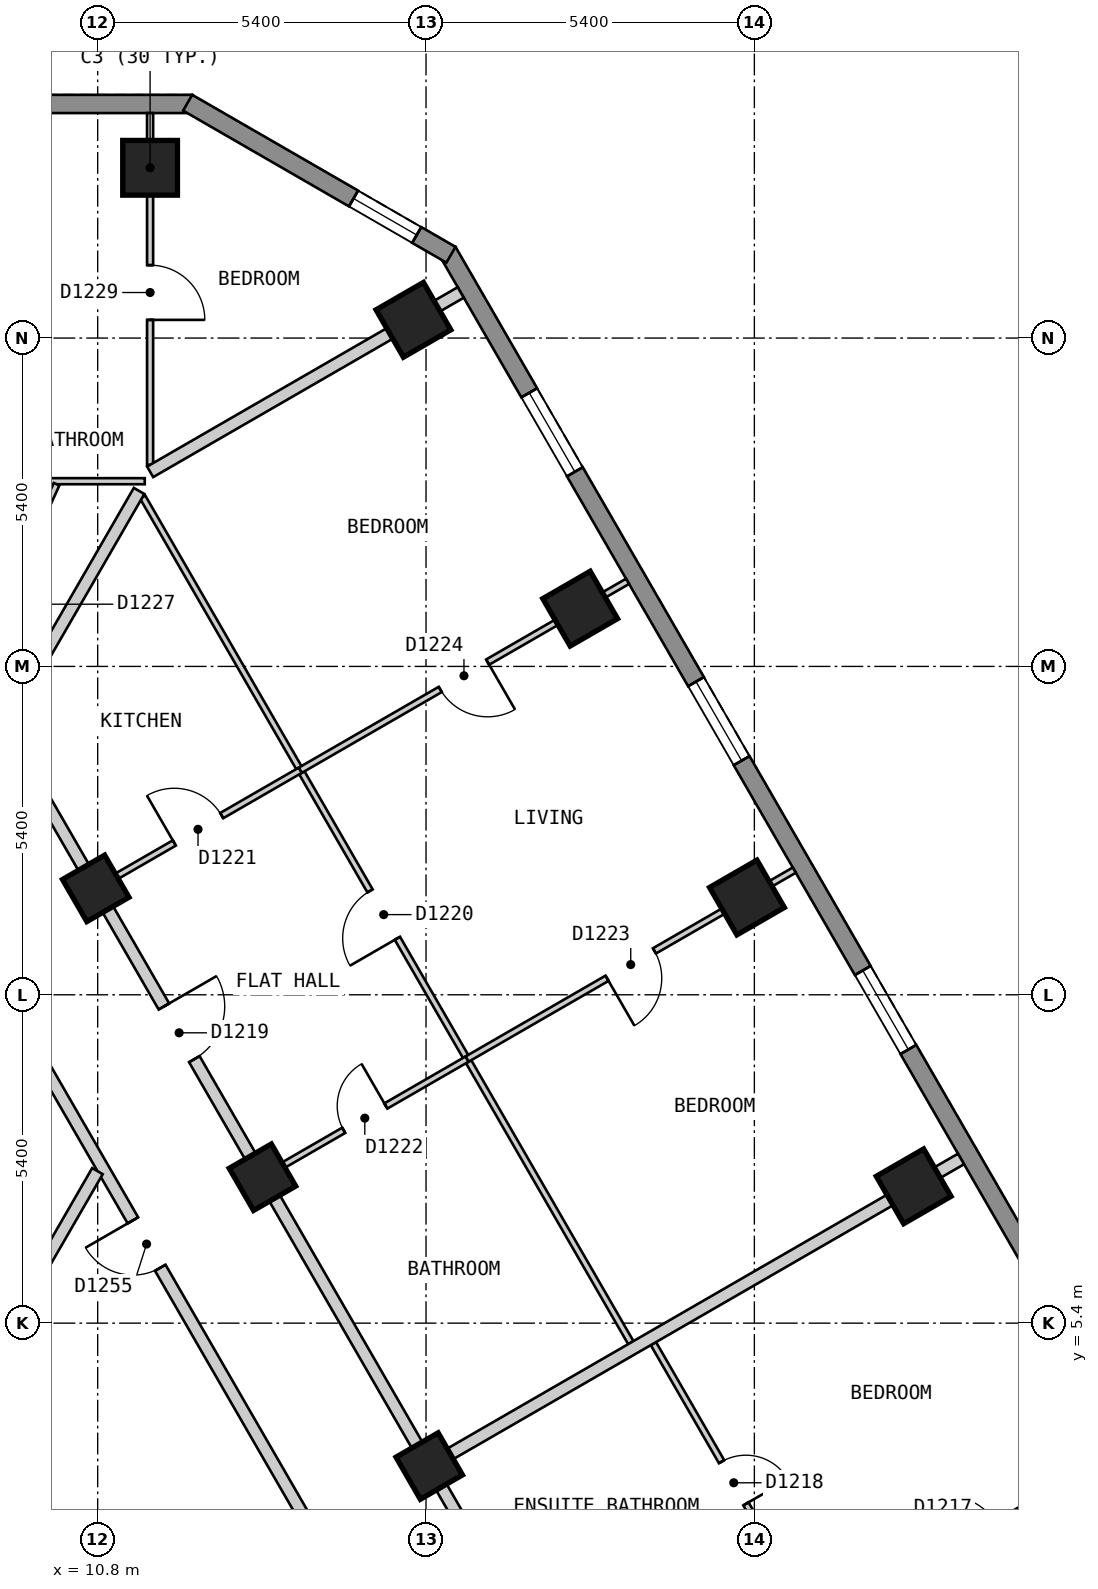
"""IFC4 building model, lengths in metres.
Left out: names, types, materials, properties, quantities, classifications, styles, units other than length and angle.
Written with IfcOpenShell. Run it as: python <this file> out.ifc"""

import sys

from ifc_helpers import new_model, si_unit, direction, frame, frame_2d, origin, origin_2d, place, context, subcontext, project, spatial, polyline, rectangle, outline, extrude, element, fill, save


model = new_model("IFC4")
c1 = context("Model", 3, precision=1e-05, world=origin(), true_north=direction((0.0, 1.0)))
c2 = subcontext(c1, "Body", "Model", "MODEL_VIEW")
j1 = project(units=[si_unit("LENGTHUNIT", "METRE"), si_unit("PLANEANGLEUNIT", "RADIAN")], contexts=[c1])
p1 = place(None, origin())
s1 = spatial("IfcSite", under=j1, at=p1, CompositionType="ELEMENT")
p2 = place(p1, origin())
s2 = spatial("IfcBuilding", under=s1, at=p2, CompositionType="ELEMENT")
p3 = place(p2, frame((0.0, 0.0, 117.6)))
s3 = spatial("IfcBuildingStorey", under=s2, at=p3, CompositionType="ELEMENT", Elevation=117.6)
for number, where, z_axis, x_axis in (
    (1, (11.662, 24.4, 0.0), (0.0, 0.0, 1.0), (-1.0, 0.0, 0.0)),
    (2, (24.22, 7.65, 0.0), (0.0, 0.0, 1.0), (-0.5, 0.866, 0.0)),
    (3, (21.478, 12.4, 0.0), (0.0, 0.0, 1.0), (-0.5, 0.866, 0.0)),
    (4, (18.735, 17.15, 0.0), (0.0, 0.0, 1.0), (-0.5, 0.866, 0.0)),
    (5, (15.993, 21.9, 0.0), (0.0, 0.0, 1.0), (-0.5, 0.866, 0.0)),
):
    element("IfcColumn", number, at=place(p3, frame(where, z_axis=z_axis, x_axis=x_axis)), inside=s3, PredefinedType="COLUMN", context=c2, shape_type="SweptSolid", body=[
        extrude(rectangle(XDim=0.9, YDim=0.9, at=origin_2d()), origin(), (0.0, 0.0, 1.0), 3.0),
    ])
for number, where, z_axis, x_axis in (
    (6, (16.253, 3.05, 0.0), (0.0, 0.0, 1.0), (-0.5, 0.866, 0.0)),
    (7, (13.51, 7.8, 0.0), (0.0, 0.0, 1.0), (-0.5, 0.866, 0.0)),
    (8, (10.768, 12.55, 0.0), (0.0, 0.0, 1.0), (-0.5, 0.866, 0.0)),
):
    element("IfcColumn", number, at=place(p3, frame(where, z_axis=z_axis, x_axis=x_axis)), inside=s3, PredefinedType="COLUMN", context=c2, shape_type="SweptSolid", body=[
        extrude(rectangle(XDim=0.8, YDim=0.8, at=origin_2d()), origin(), (0.0, 0.0, 1.0), 3.0),
    ])
p4 = place(p3, frame((12.355, 25.45, 0.0), z_axis=(0.0, 0.0, 1.0), x_axis=(-1.0, 0.0, 0.0)))
e9 = element("IfcWall", 9, at=p4, inside=s3, PredefinedType="SOLIDWALL", context=c2, shape_type="SweptSolid", body=[
    extrude(outline(polyline([(0.0, -0.15), (24.71, -0.15), (24.63, 0.15), (0.08, 0.15), (0.0, -0.15)])), origin(), (0.0, 0.0, 1.0), 2.7),
])
p5 = place(p4, frame((2.858, 0.0, 0.15)))
e10 = element("IfcOpeningElement", 10, at=p5, cuts=e9, PredefinedType="OPENING", context=c2, shape_type="SweptSolid", body=[
    extrude(rectangle(XDim=1.5, YDim=2.1, at=frame_2d((0.75, 1.05))), frame((0.0, 0.16, 0.0), z_axis=(0.0, -1.0, 0.0), x_axis=(1.0, 0.0, 0.0)), (0.0, 0.0, 1.0), 0.32),
])
p6 = place(p4, frame((8.689, 0.0, 0.15)))
e11 = element("IfcOpeningElement", 11, at=p6, cuts=e9, PredefinedType="OPENING", context=c2, shape_type="SweptSolid", body=[
    extrude(rectangle(XDim=1.5, YDim=2.1, at=frame_2d((0.75, 1.05))), frame((0.0, 0.16, 0.0), z_axis=(0.0, -1.0, 0.0), x_axis=(1.0, 0.0, 0.0)), (0.0, 0.0, 1.0), 0.32),
])
p7 = place(p4, frame((14.521, 0.0, 0.15)))
e12 = element("IfcOpeningElement", 12, at=p7, cuts=e9, PredefinedType="OPENING", context=c2, shape_type="SweptSolid", body=[
    extrude(rectangle(XDim=1.5, YDim=2.1, at=frame_2d((0.75, 1.05))), frame((0.0, 0.16, 0.0), z_axis=(0.0, -1.0, 0.0), x_axis=(1.0, 0.0, 0.0)), (0.0, 0.0, 1.0), 0.32),
])
p8 = place(p4, frame((20.352, 0.0, 0.15)))
e13 = element("IfcOpeningElement", 13, at=p8, cuts=e9, PredefinedType="OPENING", context=c2, shape_type="SweptSolid", body=[
    extrude(rectangle(XDim=1.5, YDim=2.1, at=frame_2d((0.75, 1.05))), frame((0.0, 0.16, 0.0), z_axis=(0.0, -1.0, 0.0), x_axis=(1.0, 0.0, 0.0)), (0.0, 0.0, 1.0), 0.32),
])
p9 = place(p3, frame((28.218, 2.825, 0.0), z_axis=(0.0, 0.0, 1.0), x_axis=(-0.500020536353, 0.866013546791, 0.0)))
e14 = element("IfcWall", 14, at=p9, inside=s3, PredefinedType="SOLIDWALL", context=c2, shape_type="SweptSolid", body=[
    extrude(outline(polyline([(0.0, -0.15), (23.325, -0.15), (23.245, 0.15), (0.08, 0.15), (0.0, -0.15)])), origin(), (0.0, 0.0, 1.0), 2.7),
])
p10 = place(p9, frame((2.685, 0.0, 0.15)))
e15 = element("IfcOpeningElement", 15, at=p10, cuts=e14, PredefinedType="OPENING", context=c2, shape_type="SweptSolid", body=[
    extrude(rectangle(XDim=1.5, YDim=2.1, at=frame_2d((0.75, 1.05))), frame((0.0, 0.16, 0.0), z_axis=(0.0, -1.0, 0.0), x_axis=(1.0, 0.0, 0.0)), (0.0, 0.0, 1.0), 0.32),
])
p11 = place(p9, frame((8.17, 0.0, 0.15)))
e16 = element("IfcOpeningElement", 16, at=p11, cuts=e14, PredefinedType="OPENING", context=c2, shape_type="SweptSolid", body=[
    extrude(rectangle(XDim=1.5, YDim=2.1, at=frame_2d((0.75, 1.05))), frame((0.0, 0.16, 0.0), z_axis=(0.0, -1.0, 0.0), x_axis=(1.0, 0.0, 0.0)), (0.0, 0.0, 1.0), 0.32),
])
p12 = place(p9, frame((13.655, 0.0, 0.15)))
e17 = element("IfcOpeningElement", 17, at=p12, cuts=e14, PredefinedType="OPENING", context=c2, shape_type="SweptSolid", body=[
    extrude(rectangle(XDim=1.5, YDim=2.1, at=frame_2d((0.75, 1.05))), frame((0.0, 0.16, 0.0), z_axis=(0.0, -1.0, 0.0), x_axis=(1.0, 0.0, 0.0)), (0.0, 0.0, 1.0), 0.32),
])
p13 = place(p9, frame((19.14, 0.0, 0.15)))
e18 = element("IfcOpeningElement", 18, at=p13, cuts=e14, PredefinedType="OPENING", context=c2, shape_type="SweptSolid", body=[
    extrude(rectangle(XDim=1.5, YDim=2.1, at=frame_2d((0.75, 1.05))), frame((0.0, 0.16, 0.0), z_axis=(0.0, -1.0, 0.0), x_axis=(1.0, 0.0, 0.0)), (0.0, 0.0, 1.0), 0.32),
])
p14 = place(p3, frame((16.61, 22.97, 0.0), z_axis=(0.0, 0.0, 1.0), x_axis=(-0.866022959057, 0.500004234368, 0.0)))
e19 = element("IfcWall", 19, at=p14, inside=s3, PredefinedType="SOLIDWALL", context=c2, shape_type="SweptSolid", body=[
    extrude(outline(polyline([(0.0, -0.15), (5.0, -0.15), (4.92, 0.15), (0.08, 0.15), (0.0, -0.15)])), origin(), (0.0, 0.0, 1.0), 2.7),
])
p15 = place(p14, frame((0.65, 0.0, 0.15)))
e20 = element("IfcOpeningElement", 20, at=p15, cuts=e19, PredefinedType="OPENING", context=c2, shape_type="SweptSolid", body=[
    extrude(rectangle(XDim=1.2, YDim=2.1, at=frame_2d((0.6, 1.05))), frame((0.0, 0.16, 0.0), z_axis=(0.0, -1.0, 0.0), x_axis=(1.0, 0.0, 0.0)), (0.0, 0.0, 1.0), 0.32),
])
p16 = place(p3, frame((7.967, 13.0, 0.0), z_axis=(0.0, 0.0, 1.0), x_axis=(0.50003774998, -0.866003607726, 0.0)))
e21 = element("IfcWall", 21, at=p16, inside=s3, PredefinedType="PARTITIONING", context=c2, shape_type="SweptSolid", body=[
    extrude(rectangle(XDim=14.433, YDim=0.2, at=frame_2d((7.217, 0.0))), origin(), (0.0, 0.0, 1.0), 2.7),
])
p17 = place(p16, frame((6.824, 0.0, 0.0)))
e22 = element("IfcOpeningElement", 22, at=p17, cuts=e21, PredefinedType="OPENING", context=c2, shape_type="SweptSolid", body=[
    extrude(rectangle(XDim=0.9, YDim=2.1, at=frame_2d((0.45, 1.05))), frame((0.0, 0.11, 0.0), z_axis=(0.0, -1.0, 0.0), x_axis=(1.0, 0.0, 0.0)), (0.0, 0.0, 1.0), 0.22),
])
p18 = place(p3, frame((9.296, 15.1, 0.0), z_axis=(0.0, 0.0, 1.0), x_axis=(0.499974024244, -0.866040400375, 0.0)))
e23 = element("IfcWall", 23, at=p18, inside=s3, PredefinedType="PARTITIONING", context=c2, shape_type="SweptSolid", body=[
    extrude(rectangle(XDim=16.857, YDim=0.2, at=frame_2d((8.429, 0.0))), origin(), (0.0, 0.0, 1.0), 2.7),
])
p19 = place(p18, frame((5.187, 0.0, 0.0)))
e24 = element("IfcOpeningElement", 24, at=p19, cuts=e23, PredefinedType="OPENING", context=c2, shape_type="SweptSolid", body=[
    extrude(rectangle(XDim=1.0, YDim=2.1, at=frame_2d((0.5, 1.05))), frame((0.0, 0.11, 0.0), z_axis=(0.0, -1.0, 0.0), x_axis=(1.0, 0.0, 0.0)), (0.0, 0.0, 1.0), 0.22),
])
p20 = place(p3, frame((7.028, 1.373, 0.0), z_axis=(0.0, 0.0, 1.0), x_axis=(0.499954271211, 0.866051803703, 0.0)))
e25 = element("IfcWall", 25, at=p20, inside=s3, PredefinedType="PARTITIONING", context=c2, shape_type="SweptSolid", body=[
    extrude(rectangle(XDim=7.536, YDim=0.2, at=frame_2d((3.768, 0.0))), origin(), (0.0, 0.0, 1.0), 2.7),
])
p21 = place(p3, frame((11.539, 18.986, 0.0), z_axis=(0.0, 0.0, 1.0), x_axis=(0.500019453803, -0.866014171835, 0.0)))
e26 = element("IfcWall", 26, at=p21, inside=s3, PredefinedType="PARTITIONING", context=c2, shape_type="SweptSolid", body=[
    extrude(rectangle(XDim=16.057, YDim=0.1, at=frame_2d((8.029, 0.0))), origin(), (0.0, 0.0, 1.0), 2.7),
])
p22 = place(p21, frame((7.48, 0.0, 0.0)))
e27 = element("IfcOpeningElement", 27, at=p22, cuts=e26, PredefinedType="OPENING", context=c2, shape_type="SweptSolid", body=[
    extrude(rectangle(XDim=0.9, YDim=2.1, at=frame_2d((0.45, 1.05))), frame((0.0, 0.06, 0.0), z_axis=(0.0, -1.0, 0.0), x_axis=(1.0, 0.0, 0.0)), (0.0, 0.0, 1.0), 0.12),
])
p23 = place(p3, frame((19.94, 5.063, 0.0), z_axis=(0.0, 0.0, 1.0), x_axis=(0.500025085526, -0.866010920165, 0.0)))
e28 = element("IfcWall", 28, at=p23, inside=s3, PredefinedType="PARTITIONING", context=c2, shape_type="SweptSolid", body=[
    extrude(rectangle(XDim=5.284, YDim=0.1, at=frame_2d((2.642, 0.0))), origin(), (0.0, 0.0, 1.0), 2.7),
])
p24 = place(p23, frame((2.242, 0.0, 0.0)))
e29 = element("IfcOpeningElement", 29, at=p24, cuts=e28, PredefinedType="OPENING", context=c2, shape_type="SweptSolid", body=[
    extrude(rectangle(XDim=0.8, YDim=2.1, at=frame_2d((0.4, 1.05))), frame((0.0, 0.06, 0.0), z_axis=(0.0, -1.0, 0.0), x_axis=(1.0, 0.0, 0.0)), (0.0, 0.0, 1.0), 0.12),
])
p25 = place(p3, frame((9.033, 19.246, 0.0), z_axis=(0.0, 0.0, 1.0), x_axis=(1.0, 0.0, 0.0)))
e30 = element("IfcWall", 30, at=p25, inside=s3, PredefinedType="PARTITIONING", context=c2, shape_type="SweptSolid", body=[
    extrude(rectangle(XDim=2.541, YDim=0.1, at=frame_2d((1.271, 0.0))), origin(), (0.0, 0.0, 1.0), 2.7),
])
p26 = place(p25, frame((0.117, 0.0, 0.0)))
e31 = element("IfcOpeningElement", 31, at=p26, cuts=e30, PredefinedType="OPENING", context=c2, shape_type="SweptSolid", body=[
    extrude(rectangle(XDim=0.7, YDim=2.1, at=frame_2d((0.35, 1.05))), frame((0.0, 0.06, 0.0), z_axis=(0.0, -1.0, 0.0), x_axis=(1.0, 0.0, 0.0)), (0.0, 0.0, 1.0), 0.12),
])
p27 = place(p3, frame((8.346, 15.3, 0.0), z_axis=(0.0, 0.0, 1.0), x_axis=(0.415189790387, 0.909734817383, 0.0)))
e32 = element("IfcWall", 32, at=p27, inside=s3, PredefinedType="PARTITIONING", context=c2, shape_type="SweptSolid", body=[
    extrude(rectangle(XDim=4.282, YDim=0.1, at=frame_2d((2.141, 0.0))), origin(), (0.0, 0.0, 1.0), 2.7),
])
p28 = place(p27, frame((1.714, 0.0, 0.0)))
e33 = element("IfcOpeningElement", 33, at=p28, cuts=e32, PredefinedType="OPENING", context=c2, shape_type="SweptSolid", body=[
    extrude(rectangle(XDim=0.8, YDim=2.1, at=frame_2d((0.4, 1.05))), frame((0.0, 0.06, 0.0), z_axis=(0.0, -1.0, 0.0), x_axis=(1.0, 0.0, 0.0)), (0.0, 0.0, 1.0), 0.12),
])
p29 = place(p3, frame((11.662, 19.514, 0.0), z_axis=(0.0, 0.0, 1.0), x_axis=(0.0, 1.0, 0.0)))
e34 = element("IfcWall", 34, at=p29, inside=s3, PredefinedType="PARTITIONING", context=c2, shape_type="SweptSolid", body=[
    extrude(rectangle(XDim=5.786, YDim=0.1, at=frame_2d((2.893, 0.0))), origin(), (0.0, 0.0, 1.0), 2.7),
])
p30 = place(p29, frame((2.385, 0.0, 0.0)))
e35 = element("IfcOpeningElement", 35, at=p30, cuts=e34, PredefinedType="OPENING", context=c2, shape_type="SweptSolid", body=[
    extrude(rectangle(XDim=0.9, YDim=2.1, at=frame_2d((0.45, 1.05))), frame((0.0, 0.06, 0.0), z_axis=(0.0, -1.0, 0.0), x_axis=(1.0, 0.0, 0.0)), (0.0, 0.0, 1.0), 0.12),
])
p31 = place(p3, frame((22.634, 0.401, 0.0), z_axis=(0.0, 0.0, 1.0), x_axis=(0.86601325737, 0.500021037617, 0.0)))
e36 = element("IfcWall", 36, at=p31, inside=s3, PredefinedType="PARTITIONING", context=c2, shape_type="SweptSolid", body=[
    extrude(rectangle(XDim=5.898, YDim=0.1, at=frame_2d((2.949, 0.0))), origin(), (0.0, 0.0, 1.0), 2.7),
])
p32 = place(p31, frame((2.499, 0.0, 0.0)))
e37 = element("IfcOpeningElement", 37, at=p32, cuts=e36, PredefinedType="OPENING", context=c2, shape_type="SweptSolid", body=[
    extrude(rectangle(XDim=0.9, YDim=2.1, at=frame_2d((0.45, 1.05))), frame((0.0, 0.06, 0.0), z_axis=(0.0, -1.0, 0.0), x_axis=(1.0, 0.0, 0.0)), (0.0, 0.0, 1.0), 0.12),
])
p33 = place(p3, frame((13.597, 7.85, 0.0), z_axis=(0.0, 0.0, 1.0), x_axis=(0.8660642533, 0.499932704626, 0.0)))
e38 = element("IfcWall", 38, at=p33, inside=s3, PredefinedType="PARTITIONING", context=c2, shape_type="SweptSolid", body=[
    extrude(rectangle(XDim=3.786, YDim=0.1, at=frame_2d((1.893, 0.0))), origin(), (0.0, 0.0, 1.0), 2.7),
])
p34 = place(p33, frame((1.443, 0.0, 0.0)))
e39 = element("IfcOpeningElement", 39, at=p34, cuts=e38, PredefinedType="OPENING", context=c2, shape_type="SweptSolid", body=[
    extrude(rectangle(XDim=0.8, YDim=2.1, at=frame_2d((0.4, 1.05))), frame((0.0, 0.06, 0.0), z_axis=(0.0, -1.0, 0.0), x_axis=(1.0, 0.0, 0.0)), (0.0, 0.0, 1.0), 0.12),
])
p35 = place(p3, frame((10.854, 12.6, 0.0), z_axis=(0.0, 0.0, 1.0), x_axis=(0.8660642533, 0.499932704626, 0.0)))
e40 = element("IfcWall", 40, at=p35, inside=s3, PredefinedType="PARTITIONING", context=c2, shape_type="SweptSolid", body=[
    extrude(rectangle(XDim=3.786, YDim=0.1, at=frame_2d((1.893, 0.0))), origin(), (0.0, 0.0, 1.0), 2.7),
])
p36 = place(p35, frame((1.393, 0.0, 0.0)))
e41 = element("IfcOpeningElement", 41, at=p36, cuts=e40, PredefinedType="OPENING", context=c2, shape_type="SweptSolid", body=[
    extrude(rectangle(XDim=0.9, YDim=2.1, at=frame_2d((0.45, 1.05))), frame((0.0, 0.06, 0.0), z_axis=(0.0, -1.0, 0.0), x_axis=(1.0, 0.0, 0.0)), (0.0, 0.0, 1.0), 0.12),
])
p37 = place(p3, frame((9.238, 15.2, 0.0), z_axis=(0.0, 0.0, 1.0), x_axis=(0.499890453443, 0.866088641281, 0.0)))
e42 = element("IfcWall", 42, at=p37, inside=s3, PredefinedType="PARTITIONING", context=c2, shape_type="SweptSolid", body=[
    extrude(rectangle(XDim=4.487, YDim=0.2, at=frame_2d((2.243, 0.0))), origin(), (0.0, 0.0, 1.0), 2.7),
])
p38 = place(p3, frame((16.339, 3.1, 0.0), z_axis=(0.0, 0.0, 1.0), x_axis=(0.866016855193, 0.500014806302, 0.0)))
e43 = element("IfcWall", 43, at=p38, inside=s3, PredefinedType="PARTITIONING", context=c2, shape_type="SweptSolid", body=[
    extrude(rectangle(XDim=10.0, YDim=0.2, at=frame_2d((5.0, 0.0))), origin(), (0.0, 0.0, 1.0), 2.7),
])
p39 = place(p3, frame((11.663, 19.4, 0.0), z_axis=(0.0, 0.0, 1.0), x_axis=(0.865941558533, 0.500145196124, 0.0)))
e44 = element("IfcWall", 44, at=p39, inside=s3, PredefinedType="PARTITIONING", context=c2, shape_type="SweptSolid", body=[
    extrude(rectangle(XDim=5.899, YDim=0.2, at=frame_2d((2.949, 0.0))), origin(), (0.0, 0.0, 1.0), 2.7),
])
p40 = place(p3, frame((16.876, 9.743, 0.0), z_axis=(0.0, 0.0, 1.0), x_axis=(0.865997794851, 0.500047817026, 0.0)))
e45 = element("IfcWall", 45, at=p40, inside=s3, PredefinedType="PARTITIONING", context=c2, shape_type="SweptSolid", body=[
    extrude(rectangle(XDim=6.214, YDim=0.1, at=frame_2d((3.107, 0.0))), origin(), (0.0, 0.0, 1.0), 2.7),
])
p41 = place(p40, frame((2.657, 0.0, 0.0)))
e46 = element("IfcOpeningElement", 46, at=p41, cuts=e45, PredefinedType="OPENING", context=c2, shape_type="SweptSolid", body=[
    extrude(rectangle(XDim=0.9, YDim=2.1, at=frame_2d((0.45, 1.05))), frame((0.0, 0.06, 0.0), z_axis=(0.0, -1.0, 0.0), x_axis=(1.0, 0.0, 0.0)), (0.0, 0.0, 1.0), 0.12),
])
p42 = place(p3, frame((14.133, 14.493, 0.0), z_axis=(0.0, 0.0, 1.0), x_axis=(0.866056028236, 0.499946953142, 0.0)))
e47 = element("IfcWall", 47, at=p42, inside=s3, PredefinedType="PARTITIONING", context=c2, shape_type="SweptSolid", body=[
    extrude(rectangle(XDim=6.213, YDim=0.1, at=frame_2d((3.106, 0.0))), origin(), (0.0, 0.0, 1.0), 2.7),
])
p43 = place(p42, frame((2.657, 0.0, 0.0)))
e48 = element("IfcOpeningElement", 48, at=p43, cuts=e47, PredefinedType="OPENING", context=c2, shape_type="SweptSolid", body=[
    extrude(rectangle(XDim=0.9, YDim=2.1, at=frame_2d((0.45, 1.05))), frame((0.0, 0.06, 0.0), z_axis=(0.0, -1.0, 0.0), x_axis=(1.0, 0.0, 0.0)), (0.0, 0.0, 1.0), 0.12),
])
p44 = place(p11, origin())
e49 = element("IfcWindow", 49, at=p44, inside=s3, PartitioningType="SINGLE_PANEL", PredefinedType="WINDOW", context=c2, shape_type="SweptSolid", body=[
    extrude(rectangle(XDim=1.5, YDim=2.1, at=frame_2d((0.75, 1.05))), frame((0.0, 0.03, 0.0), z_axis=(0.0, -1.0, 0.0), x_axis=(1.0, 0.0, 0.0)), (0.0, 0.0, 1.0), 0.06),
])
fill(e16, e49)
p45 = place(p12, origin())
e50 = element("IfcWindow", 50, at=p45, inside=s3, PartitioningType="SINGLE_PANEL", PredefinedType="WINDOW", context=c2, shape_type="SweptSolid", body=[
    extrude(rectangle(XDim=1.5, YDim=2.1, at=frame_2d((0.75, 1.05))), frame((0.0, 0.03, 0.0), z_axis=(0.0, -1.0, 0.0), x_axis=(1.0, 0.0, 0.0)), (0.0, 0.0, 1.0), 0.06),
])
fill(e17, e50)
p46 = place(p13, origin())
e51 = element("IfcWindow", 51, at=p46, inside=s3, PartitioningType="SINGLE_PANEL", PredefinedType="WINDOW", context=c2, shape_type="SweptSolid", body=[
    extrude(rectangle(XDim=1.5, YDim=2.1, at=frame_2d((0.75, 1.05))), frame((0.0, 0.03, 0.0), z_axis=(0.0, -1.0, 0.0), x_axis=(1.0, 0.0, 0.0)), (0.0, 0.0, 1.0), 0.06),
])
fill(e18, e51)
p47 = place(p15, origin())
e52 = element("IfcWindow", 52, at=p47, inside=s3, PartitioningType="SINGLE_PANEL", PredefinedType="WINDOW", context=c2, shape_type="SweptSolid", body=[
    extrude(rectangle(XDim=1.2, YDim=2.1, at=frame_2d((0.6, 1.05))), frame((0.0, 0.03, 0.0), z_axis=(0.0, -1.0, 0.0), x_axis=(1.0, 0.0, 0.0)), (0.0, 0.0, 1.0), 0.06),
])
fill(e20, e52)
p48 = place(p24, origin())
e53 = element("IfcDoor", 53, at=p48, inside=s3, OperationType="SINGLE_SWING_RIGHT", PredefinedType="DOOR", context=c2, shape_type="SweptSolid", body=[
    extrude(rectangle(XDim=0.8, YDim=2.1, at=frame_2d((0.4, 1.05))), frame((0.0, 0.025, 0.0), z_axis=(0.0, -1.0, 0.0), x_axis=(1.0, 0.0, 0.0)), (0.0, 0.0, 1.0), 0.05),
])
fill(e29, e53)
p49 = place(p19, origin())
e54 = element("IfcDoor", 54, at=p49, inside=s3, OperationType="SINGLE_SWING_LEFT", PredefinedType="DOOR", context=c2, shape_type="SweptSolid", body=[
    extrude(rectangle(XDim=1.0, YDim=2.1, at=frame_2d((0.5, 1.05))), frame((0.0, 0.025, 0.0), z_axis=(0.0, -1.0, 0.0), x_axis=(1.0, 0.0, 0.0)), (0.0, 0.0, 1.0), 0.05),
])
fill(e24, e54)
p50 = place(p22, origin())
e55 = element("IfcDoor", 55, at=p50, inside=s3, OperationType="SINGLE_SWING_RIGHT", PredefinedType="DOOR", context=c2, shape_type="SweptSolid", body=[
    extrude(rectangle(XDim=0.9, YDim=2.1, at=frame_2d((0.45, 1.05))), frame((0.0, 0.025, 0.0), z_axis=(0.0, -1.0, 0.0), x_axis=(1.0, 0.0, 0.0)), (0.0, 0.0, 1.0), 0.05),
])
fill(e27, e55)
p51 = place(p36, origin())
e56 = element("IfcDoor", 56, at=p51, inside=s3, OperationType="SINGLE_SWING_LEFT", PredefinedType="DOOR", context=c2, shape_type="SweptSolid", body=[
    extrude(rectangle(XDim=0.9, YDim=2.1, at=frame_2d((0.45, 1.05))), frame((0.0, 0.025, 0.0), z_axis=(0.0, -1.0, 0.0), x_axis=(1.0, 0.0, 0.0)), (0.0, 0.0, 1.0), 0.05),
])
fill(e41, e56)
p52 = place(p34, origin())
e57 = element("IfcDoor", 57, at=p52, inside=s3, OperationType="SINGLE_SWING_RIGHT", PredefinedType="DOOR", context=c2, shape_type="SweptSolid", body=[
    extrude(rectangle(XDim=0.8, YDim=2.1, at=frame_2d((0.4, 1.05))), frame((0.0, 0.025, 0.0), z_axis=(0.0, -1.0, 0.0), x_axis=(1.0, 0.0, 0.0)), (0.0, 0.0, 1.0), 0.05),
])
fill(e39, e57)
p53 = place(p41, origin())
e58 = element("IfcDoor", 58, at=p53, inside=s3, OperationType="SINGLE_SWING_LEFT", PredefinedType="DOOR", context=c2, shape_type="SweptSolid", body=[
    extrude(rectangle(XDim=0.9, YDim=2.1, at=frame_2d((0.45, 1.05))), frame((0.0, 0.025, 0.0), z_axis=(0.0, -1.0, 0.0), x_axis=(1.0, 0.0, 0.0)), (0.0, 0.0, 1.0), 0.05),
])
fill(e46, e58)
p54 = place(p43, origin())
e59 = element("IfcDoor", 59, at=p54, inside=s3, OperationType="SINGLE_SWING_RIGHT", PredefinedType="DOOR", context=c2, shape_type="SweptSolid", body=[
    extrude(rectangle(XDim=0.9, YDim=2.1, at=frame_2d((0.45, 1.05))), frame((0.0, 0.025, 0.0), z_axis=(0.0, -1.0, 0.0), x_axis=(1.0, 0.0, 0.0)), (0.0, 0.0, 1.0), 0.05),
])
fill(e48, e59)
p55 = place(p30, origin())
e60 = element("IfcDoor", 60, at=p55, inside=s3, OperationType="SINGLE_SWING_LEFT", PredefinedType="DOOR", context=c2, shape_type="SweptSolid", body=[
    extrude(rectangle(XDim=0.9, YDim=2.1, at=frame_2d((0.45, 1.05))), frame((0.0, 0.025, 0.0), z_axis=(0.0, -1.0, 0.0), x_axis=(1.0, 0.0, 0.0)), (0.0, 0.0, 1.0), 0.05),
])
fill(e35, e60)
p56 = place(p17, origin())
e61 = element("IfcDoor", 61, at=p56, inside=s3, OperationType="SINGLE_SWING_LEFT", PredefinedType="DOOR", context=c2, shape_type="SweptSolid", body=[
    extrude(rectangle(XDim=0.9, YDim=2.1, at=frame_2d((0.45, 1.05))), frame((0.0, 0.025, 0.0), z_axis=(0.0, -1.0, 0.0), x_axis=(1.0, 0.0, 0.0)), (0.0, 0.0, 1.0), 0.05),
])
fill(e22, e61)
save(model, sys.argv[1])
